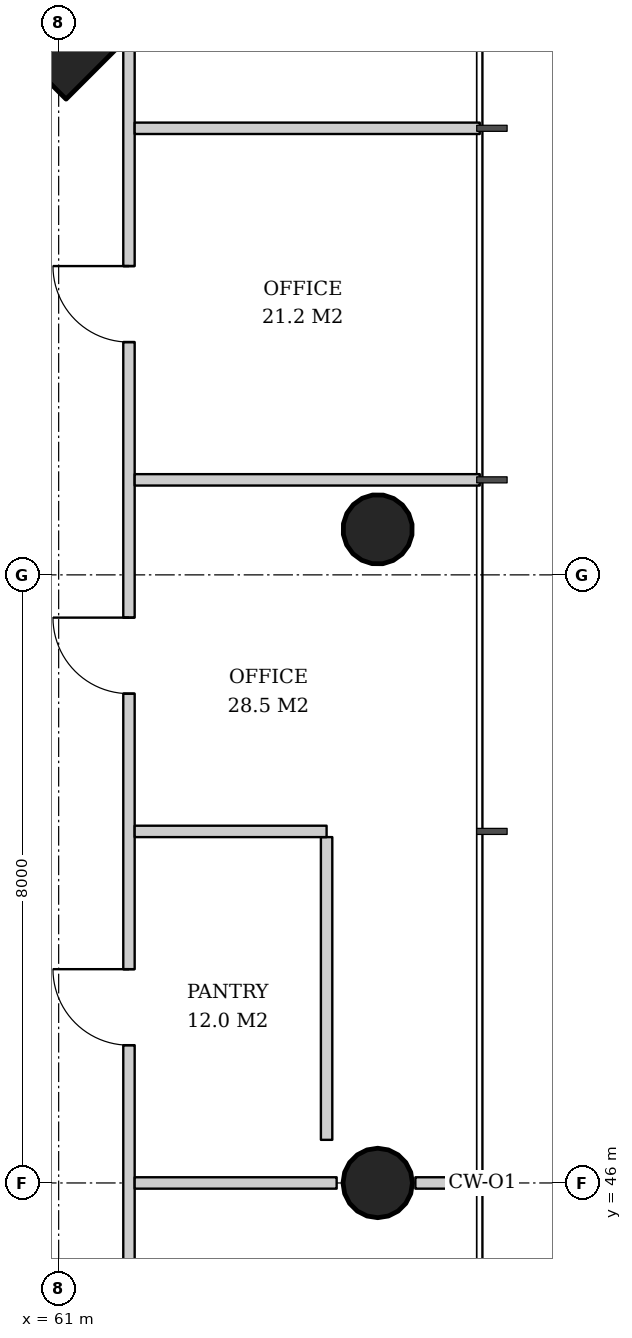
"""IFC4 building model, lengths in metres.
Left out: names, types, materials, properties, quantities, classifications, styles, units other than length and angle.
Written with IfcOpenShell. Run it as: python <this file> out.ifc"""

import sys

from ifc_helpers import new_model, si_unit, direction, frame, frame_2d, origin, origin_2d, place, context, subcontext, project, spatial, rectangle, hollow_circle, extrude, element, fill, save


model = new_model("IFC4")
c1 = context("Model", 3, precision=1e-05, world=origin(), true_north=direction((0.0, 1.0)))
c2 = subcontext(c1, "Body", "Model", "MODEL_VIEW")
j1 = project(units=[si_unit("LENGTHUNIT", "METRE"), si_unit("PLANEANGLEUNIT", "RADIAN")], contexts=[c1])
p1 = place(None, origin())
s1 = spatial("IfcSite", under=j1, at=p1, CompositionType="ELEMENT")
p2 = place(p1, origin())
s2 = spatial("IfcBuilding", under=s1, at=p2, CompositionType="ELEMENT")
p3 = place(p2, frame((0.0, 0.0, 138.8)))
s3 = spatial("IfcBuildingStorey", under=s2, at=p3, CompositionType="ELEMENT", Elevation=138.8)
p4 = place(p3, frame((61.136, 62.136, 0.0), z_axis=(-0.031898107953, -0.031898107953, 0.998981992539), x_axis=(0.707106781187, -0.707106781187, 0.0)))
e1 = element("IfcColumn", 1, at=p4, inside=s3, PredefinedType="COLUMN", context=c2, shape_type="SweptSolid", body=[
    extrude(rectangle(XDim=2.6, YDim=2.6, at=origin_2d()), origin(), (0.0, 0.0, 1.0), 3.804),
])
p5 = place(p3, frame((65.236, 46.0, 0.0), z_axis=(-0.031914348339, 0.0, 0.999490607445), x_axis=(0.0, -1.0, 0.0)))
e2 = element("IfcColumn", 2, at=p5, inside=s3, PredefinedType="COLUMN", context=c2, shape_type="SweptSolid", body=[
    extrude(hollow_circle(Radius=0.457, WallThickness=0.03, at=origin_2d()), origin(), (0.0, 0.0, 1.0), 3.802),
])
p6 = place(p3, frame((65.236, 54.618, 0.0), z_axis=(-0.031910269556, -0.015987237665, 0.999362868496), x_axis=(0.447933021895, -0.894067115991, 0.0)))
e3 = element("IfcColumn", 3, at=p6, inside=s3, PredefinedType="COLUMN", context=c2, shape_type="SweptSolid", body=[
    extrude(hollow_circle(Radius=0.457, WallThickness=0.03, at=origin_2d()), origin(), (0.0, 0.0, 1.0), 3.802),
])
p7 = place(p3, frame((64.525, 46.567, 0.0), z_axis=(0.0, 0.0, 1.0), x_axis=(0.0, 1.0, 0.0)))
e4 = element("IfcWall", 4, at=p7, inside=s3, PredefinedType="PARTITIONING", context=c2, shape_type="SweptSolid", body=[
    extrude(rectangle(XDim=3.983, YDim=0.15, at=frame_2d((1.991, 0.0))), origin(), (0.0, 0.0, 1.0), 2.858),
])
p8 = place(p3, frame((61.925, 30.989, 0.0), z_axis=(0.0, 0.0, 1.0), x_axis=(0.0, 1.0, 0.0)))
e5 = element("IfcWall", 5, at=p8, inside=s3, PredefinedType="PARTITIONING", context=c2, shape_type="SweptSolid", body=[
    extrude(rectangle(XDim=30.023, YDim=0.15, at=frame_2d((15.011, 0.0))), origin(), (0.0, 0.0, 1.0), 2.72),
])
p9 = place(p8, frame((2.949, 0.0, 0.0)))
e6 = element("IfcOpeningElement", 6, at=p9, cuts=e5, PredefinedType="OPENING", context=c2, shape_type="SweptSolid", body=[
    extrude(rectangle(XDim=1.0, YDim=2.1, at=frame_2d((0.5, 1.05))), frame((0.0, 0.085, 0.0), z_axis=(0.0, -1.0, 0.0), x_axis=(1.0, 0.0, 0.0)), (0.0, 0.0, 1.0), 0.17),
])
p10 = place(p8, frame((7.574, 0.0, 0.0)))
e7 = element("IfcOpeningElement", 7, at=p10, cuts=e5, PredefinedType="OPENING", context=c2, shape_type="SweptSolid", body=[
    extrude(rectangle(XDim=1.0, YDim=2.1, at=frame_2d((0.5, 1.05))), frame((0.0, 0.085, 0.0), z_axis=(0.0, -1.0, 0.0), x_axis=(1.0, 0.0, 0.0)), (0.0, 0.0, 1.0), 0.17),
])
p11 = place(p8, frame((12.199, 0.0, 0.0)))
e8 = element("IfcOpeningElement", 8, at=p11, cuts=e5, PredefinedType="OPENING", context=c2, shape_type="SweptSolid", body=[
    extrude(rectangle(XDim=1.0, YDim=2.1, at=frame_2d((0.5, 1.05))), frame((0.0, 0.085, 0.0), z_axis=(0.0, -1.0, 0.0), x_axis=(1.0, 0.0, 0.0)), (0.0, 0.0, 1.0), 0.17),
])
p12 = place(p8, frame((16.824, 0.0, 0.0)))
e9 = element("IfcOpeningElement", 9, at=p12, cuts=e5, PredefinedType="OPENING", context=c2, shape_type="SweptSolid", body=[
    extrude(rectangle(XDim=1.0, YDim=2.1, at=frame_2d((0.5, 1.05))), frame((0.0, 0.085, 0.0), z_axis=(0.0, -1.0, 0.0), x_axis=(1.0, 0.0, 0.0)), (0.0, 0.0, 1.0), 0.17),
])
p13 = place(p8, frame((21.449, 0.0, 0.0)))
e10 = element("IfcOpeningElement", 10, at=p13, cuts=e5, PredefinedType="OPENING", context=c2, shape_type="SweptSolid", body=[
    extrude(rectangle(XDim=1.0, YDim=2.1, at=frame_2d((0.5, 1.05))), frame((0.0, 0.085, 0.0), z_axis=(0.0, -1.0, 0.0), x_axis=(1.0, 0.0, 0.0)), (0.0, 0.0, 1.0), 0.17),
])
p14 = place(p8, frame((26.074, 0.0, 0.0)))
e11 = element("IfcOpeningElement", 11, at=p14, cuts=e5, PredefinedType="OPENING", context=c2, shape_type="SweptSolid", body=[
    extrude(rectangle(XDim=1.0, YDim=2.1, at=frame_2d((0.5, 1.05))), frame((0.0, 0.085, 0.0), z_axis=(0.0, -1.0, 0.0), x_axis=(1.0, 0.0, 0.0)), (0.0, 0.0, 1.0), 0.17),
])
p15 = place(p3, frame((62.0, 46.0, 0.0), z_axis=(0.0, 0.0, 1.0), x_axis=(1.0, 0.0, 0.0)))
e12 = element("IfcWall", 12, at=p15, inside=s3, PredefinedType="PARTITIONING", context=c2, shape_type="SweptSolid", body=[
    extrude(rectangle(XDim=2.657, YDim=0.15, at=frame_2d((1.329, 0.0))), origin(), (0.0, 0.0, 1.0), 3.62),
])
p16 = place(p3, frame((65.693, 46.0, 0.0), z_axis=(0.0, 0.0, 1.0), x_axis=(1.0, 0.0, 0.0)))
e13 = element("IfcWall", 13, at=p16, inside=s3, PredefinedType="PARTITIONING", context=c2, shape_type="SweptSolid", body=[
    extrude(rectangle(XDim=0.847, YDim=0.15, at=frame_2d((0.424, 0.0))), origin(), (0.0, 0.0, 1.0), 3.62),
])
p17 = place(p3, frame((62.0, 50.625, 0.0), z_axis=(0.0, 0.0, 1.0), x_axis=(1.0, 0.0, 0.0)))
e14 = element("IfcWall", 14, at=p17, inside=s3, PredefinedType="PARTITIONING", context=c2, shape_type="SweptSolid", body=[
    extrude(rectangle(XDim=2.525, YDim=0.15, at=frame_2d((1.262, 0.0))), origin(), (0.0, 0.0, 1.0), 3.62),
])
for number, where, z_axis, x_axis in (
    (15, (62.0, 55.25, 0.0), (0.0, 0.0, 1.0), (1.0, 0.0, 0.0)),
    (16, (62.0, 59.875, 0.0), (0.0, 0.0, 1.0), (1.0, 0.0, 0.0)),
):
    element("IfcWall", number, at=place(p3, frame(where, z_axis=z_axis, x_axis=x_axis)), inside=s3, PredefinedType="PARTITIONING", context=c2, shape_type="SweptSolid", body=[
        extrude(rectangle(XDim=4.54, YDim=0.15, at=frame_2d((2.27, 0.0))), origin(), (0.0, 0.0, 1.0), 2.82),
    ])
p18 = place(p12, origin())
e17 = element("IfcDoor", 17, at=p18, inside=s3, OperationType="SINGLE_SWING_RIGHT", PredefinedType="DOOR", context=c2, shape_type="SweptSolid", body=[
    extrude(rectangle(XDim=1.0, YDim=2.1, at=frame_2d((0.5, 1.05))), frame((0.0, 0.025, 0.0), z_axis=(0.0, -1.0, 0.0), x_axis=(1.0, 0.0, 0.0)), (0.0, 0.0, 1.0), 0.05),
])
fill(e9, e17)
p19 = place(p13, origin())
e18 = element("IfcDoor", 18, at=p19, inside=s3, OperationType="SINGLE_SWING_RIGHT", PredefinedType="DOOR", context=c2, shape_type="SweptSolid", body=[
    extrude(rectangle(XDim=1.0, YDim=2.1, at=frame_2d((0.5, 1.05))), frame((0.0, 0.025, 0.0), z_axis=(0.0, -1.0, 0.0), x_axis=(1.0, 0.0, 0.0)), (0.0, 0.0, 1.0), 0.05),
])
fill(e10, e18)
p20 = place(p14, origin())
e19 = element("IfcDoor", 19, at=p20, inside=s3, OperationType="SINGLE_SWING_RIGHT", PredefinedType="DOOR", context=c2, shape_type="SweptSolid", body=[
    extrude(rectangle(XDim=1.0, YDim=2.1, at=frame_2d((0.5, 1.05))), frame((0.0, 0.025, 0.0), z_axis=(0.0, -1.0, 0.0), x_axis=(1.0, 0.0, 0.0)), (0.0, 0.0, 1.0), 0.05),
])
fill(e11, e19)
save(model, sys.argv[1])
